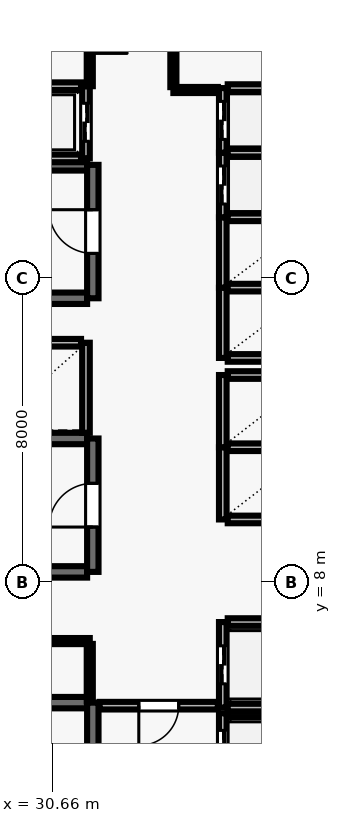
"""IFC4 building model, lengths in metres.
Left out: names, types, materials, properties, quantities, classifications, styles, units other than length and angle.
Written with IfcOpenShell. Run it as: python <this file> out.ifc"""

import sys

from ifc_helpers import new_model, si_unit, direction, frame, frame_2d, origin, place, context, subcontext, project, spatial, rectangle, extrude, element, fill, save


model = new_model("IFC4")
c1 = context("Model", 3, precision=1e-05, world=origin(), true_north=direction((0.0, 1.0)))
c2 = subcontext(c1, "Body", "Model", "MODEL_VIEW")
j1 = project(units=[si_unit("LENGTHUNIT", "METRE"), si_unit("PLANEANGLEUNIT", "RADIAN")], contexts=[c1])
p1 = place(None, origin())
s1 = spatial("IfcSite", under=j1, at=p1, CompositionType="ELEMENT")
p2 = place(p1, origin())
s2 = spatial("IfcBuilding", under=s1, at=p2, CompositionType="ELEMENT")
p3 = place(p2, frame((0.0, 0.0, 122.9)))
s3 = spatial("IfcBuildingStorey", under=s2, at=p3, CompositionType="ELEMENT", Elevation=122.9)
p4 = place(p3, frame((31.58, 4.83, 0.0), z_axis=(0.0, 0.0, 1.0), x_axis=(-1.0, 0.0, 0.0)))
e1 = element("IfcWall", 1, at=p4, inside=s3, PredefinedType="SHEAR", context=c2, shape_type="SweptSolid", body=[
    extrude(rectangle(XDim=8.36, YDim=0.3, at=frame_2d((4.18, 0.0))), origin(), (0.0, 0.0, 1.0), 3.69),
])
p5 = place(p3, frame((31.73, 0.96, 0.0), z_axis=(0.0, 0.0, 1.0), x_axis=(0.0, 1.0, 0.0)))
e2 = element("IfcWall", 2, at=p5, inside=s3, PredefinedType="SHEAR", context=c2, shape_type="SweptSolid", body=[
    extrude(rectangle(XDim=3.87, YDim=0.3, at=frame_2d((1.935, 0.0))), origin(), (0.0, 0.0, 1.0), 3.69),
])
p6 = place(p5, frame((1.54, 0.0, 0.0)))
e3 = element("IfcOpeningElement", 3, at=p6, cuts=e2, PredefinedType="OPENING", context=c2, shape_type="SweptSolid", body=[
    extrude(rectangle(XDim=1.15, YDim=2.15, at=frame_2d((0.575, 1.075))), frame((0.0, 0.16, 0.0), z_axis=(0.0, -1.0, 0.0), x_axis=(1.0, 0.0, 0.0)), (0.0, 0.0, 1.0), 0.32),
])
for number, where, z_axis, x_axis in (
    (4, (31.58, 18.98, 0.0), (0.0, 0.0, 1.0), (-1.0, 0.0, 0.0)),
    (5, (23.22, 15.47, 0.0), (0.0, 0.0, 1.0), (1.0, 0.0, 0.0)),
):
    element("IfcWall", number, at=place(p3, frame(where, z_axis=z_axis, x_axis=x_axis)), inside=s3, PredefinedType="SHEAR", context=c2, shape_type="SweptSolid", body=[
        extrude(rectangle(XDim=8.36, YDim=0.3, at=frame_2d((4.18, 0.0))), origin(), (0.0, 0.0, 1.0), 3.69),
    ])
p7 = place(p3, frame((31.73, 15.47, 0.0), z_axis=(0.0, 0.0, 1.0), x_axis=(0.0, 1.0, 0.0)))
e6 = element("IfcWall", 6, at=p7, inside=s3, PredefinedType="SHEAR", context=c2, shape_type="SweptSolid", body=[
    extrude(rectangle(XDim=3.51, YDim=0.3, at=frame_2d((1.755, 0.0))), origin(), (0.0, 0.0, 1.0), 3.69),
])
p8 = place(p7, frame((1.18, 0.0, 0.0)))
e7 = element("IfcOpeningElement", 7, at=p8, cuts=e6, PredefinedType="OPENING", context=c2, shape_type="SweptSolid", body=[
    extrude(rectangle(XDim=1.15, YDim=2.15, at=frame_2d((0.575, 1.075))), frame((0.0, 0.16, 0.0), z_axis=(0.0, -1.0, 0.0), x_axis=(1.0, 0.0, 0.0)), (0.0, 0.0, 1.0), 0.32),
])
for number, where, z_axis, x_axis in (
    (8, (31.58, 11.78, 0.0), (0.0, 0.0, 1.0), (-1.0, 0.0, 0.0)),
    (9, (23.22, 8.27, 0.0), (0.0, 0.0, 1.0), (1.0, 0.0, 0.0)),
):
    element("IfcWall", number, at=place(p3, frame(where, z_axis=z_axis, x_axis=x_axis)), inside=s3, PredefinedType="SHEAR", context=c2, shape_type="SweptSolid", body=[
        extrude(rectangle(XDim=8.36, YDim=0.3, at=frame_2d((4.18, 0.0))), origin(), (0.0, 0.0, 1.0), 3.69),
    ])
p9 = place(p3, frame((31.73, 8.27, 0.0), z_axis=(0.0, 0.0, 1.0), x_axis=(0.0, 1.0, 0.0)))
e10 = element("IfcWall", 10, at=p9, inside=s3, PredefinedType="SHEAR", context=c2, shape_type="SweptSolid", body=[
    extrude(rectangle(XDim=3.51, YDim=0.3, at=frame_2d((1.755, 0.0))), origin(), (0.0, 0.0, 1.0), 3.69),
])
p10 = place(p9, frame((1.18, 0.0, 0.0)))
e11 = element("IfcOpeningElement", 11, at=p10, cuts=e10, PredefinedType="OPENING", context=c2, shape_type="SweptSolid", body=[
    extrude(rectangle(XDim=1.15, YDim=2.15, at=frame_2d((0.575, 1.075))), frame((0.0, 0.16, 0.0), z_axis=(0.0, -1.0, 0.0), x_axis=(1.0, 0.0, 0.0)), (0.0, 0.0, 1.0), 0.32),
])
p11 = place(p3, frame((35.15, 4.55, 0.0), z_axis=(0.0, 0.0, 1.0), x_axis=(0.0, -1.0, 0.0)))
e12 = element("IfcWall", 12, at=p11, inside=s3, PredefinedType="SOLIDWALL", context=c2, shape_type="SweptSolid", body=[
    extrude(rectangle(XDim=2.1, YDim=0.2, at=frame_2d((1.05, 0.0))), origin(), (0.0, 0.0, 1.0), 3.69),
])
p12 = place(p11, frame((0.45, 0.0, 0.0)))
e13 = element("IfcOpeningElement", 13, at=p12, cuts=e12, PredefinedType="OPENING", context=c2, shape_type="SweptSolid", body=[
    extrude(rectangle(XDim=1.2, YDim=2.15, at=frame_2d((0.6, 1.075))), frame((0.0, 0.11, 0.0), z_axis=(0.0, -1.0, 0.0), x_axis=(1.0, 0.0, 0.0)), (0.0, 0.0, 1.0), 0.22),
])
p13 = place(p3, frame((37.42, 4.55, 0.0), z_axis=(0.0, 0.0, 1.0), x_axis=(-1.0, 0.0, 0.0)))
e14 = element("IfcWall", 14, at=p13, inside=s3, PredefinedType="SOLIDWALL", context=c2, shape_type="SweptSolid", body=[
    extrude(rectangle(XDim=2.14, YDim=0.2, at=frame_2d((1.07, 0.0))), origin(), (0.0, 0.0, 1.0), 3.69),
])
p14 = place(p3, frame((35.15, 6.95, 0.0), z_axis=(0.0, 0.0, 1.0), x_axis=(0.0, -1.0, 0.0)))
e15 = element("IfcWall", 15, at=p14, inside=s3, PredefinedType="SOLIDWALL", context=c2, shape_type="SweptSolid", body=[
    extrude(rectangle(XDim=2.25, YDim=0.2, at=frame_2d((1.125, 0.0))), origin(), (0.0, 0.0, 1.0), 3.69),
])
p15 = place(p14, frame((0.625, 0.0, 0.0)))
e16 = element("IfcOpeningElement", 16, at=p15, cuts=e15, PredefinedType="OPENING", context=c2, shape_type="SweptSolid", body=[
    extrude(rectangle(XDim=1.0, YDim=2.1, at=frame_2d((0.5, 1.05))), frame((0.0, 0.11, 0.0), z_axis=(0.0, -1.0, 0.0), x_axis=(1.0, 0.0, 0.0)), (0.0, 0.0, 1.0), 0.22),
])
for number, where, z_axis, x_axis in (
    (17, (35.28, 4.7, 0.0), (0.0, 0.0, 1.0), (1.0, 0.0, 0.0)),
    (18, (37.42, 6.95, 0.0), (0.0, 0.0, 1.0), (-1.0, 0.0, 0.0)),
):
    element("IfcWall", number, at=place(p3, frame(where, z_axis=z_axis, x_axis=x_axis)), inside=s3, PredefinedType="SOLIDWALL", context=c2, shape_type="SweptSolid", body=[
        extrude(rectangle(XDim=2.14, YDim=0.2, at=frame_2d((1.07, 0.0))), origin(), (0.0, 0.0, 1.0), 3.69),
    ])
p16 = place(p3, frame((35.15, 11.55, 0.0), z_axis=(0.0, 0.0, 1.0), x_axis=(0.0, -1.0, 0.0)))
e19 = element("IfcWall", 19, at=p16, inside=s3, PredefinedType="SOLIDWALL", context=c2, shape_type="SweptSolid", body=[
    extrude(rectangle(XDim=1.9, YDim=0.2, at=frame_2d((0.95, 0.0))), origin(), (0.0, 0.0, 1.0), 3.69),
])
for number, where, z_axis, x_axis in (
    (20, (35.28, 9.65, 0.0), (0.0, 0.0, 1.0), (1.0, 0.0, 0.0)),
    (21, (37.42, 11.55, 0.0), (0.0, 0.0, 1.0), (-1.0, 0.0, 0.0)),
):
    element("IfcWall", number, at=place(p3, frame(where, z_axis=z_axis, x_axis=x_axis)), inside=s3, PredefinedType="SOLIDWALL", context=c2, shape_type="SweptSolid", body=[
        extrude(rectangle(XDim=2.14, YDim=0.2, at=frame_2d((1.07, 0.0))), origin(), (0.0, 0.0, 1.0), 3.69),
    ])
p17 = place(p3, frame((35.15, 13.45, 0.0), z_axis=(0.0, 0.0, 1.0), x_axis=(0.0, -1.0, 0.0)))
e22 = element("IfcWall", 22, at=p17, inside=s3, PredefinedType="SOLIDWALL", context=c2, shape_type="SweptSolid", body=[
    extrude(rectangle(XDim=1.9, YDim=0.2, at=frame_2d((0.95, 0.0))), origin(), (0.0, 0.0, 1.0), 3.69),
])
p18 = place(p3, frame((37.42, 13.45, 0.0), z_axis=(0.0, 0.0, 1.0), x_axis=(-1.0, 0.0, 0.0)))
e23 = element("IfcWall", 23, at=p18, inside=s3, PredefinedType="SOLIDWALL", context=c2, shape_type="SweptSolid", body=[
    extrude(rectangle(XDim=2.14, YDim=0.2, at=frame_2d((1.07, 0.0))), origin(), (0.0, 0.0, 1.0), 3.69),
])
p19 = place(p3, frame((31.55, 11.93, 0.0), z_axis=(0.0, 0.0, 1.0), x_axis=(0.0, 1.0, 0.0)))
e24 = element("IfcWall", 24, at=p19, inside=s3, PredefinedType="SOLIDWALL", context=c2, shape_type="SweptSolid", body=[
    extrude(rectangle(XDim=2.37, YDim=0.2, at=frame_2d((1.185, 0.0))), origin(), (0.0, 0.0, 1.0), 3.69),
])
p20 = place(p3, frame((31.42, 14.3, 0.0), z_axis=(0.0, 0.0, 1.0), x_axis=(-1.0, 0.0, 0.0)))
e25 = element("IfcWall", 25, at=p20, inside=s3, PredefinedType="SOLIDWALL", context=c2, shape_type="SweptSolid", body=[
    extrude(rectangle(XDim=2.44, YDim=0.2, at=frame_2d((1.22, 0.0))), origin(), (0.0, 0.0, 1.0), 3.69),
])
p21 = place(p3, frame((35.15, 15.75, 0.0), z_axis=(0.0, 0.0, 1.0), x_axis=(0.0, -1.0, 0.0)))
e26 = element("IfcWall", 26, at=p21, inside=s3, PredefinedType="SOLIDWALL", context=c2, shape_type="SweptSolid", body=[
    extrude(rectangle(XDim=1.85, YDim=0.2, at=frame_2d((0.925, 0.0))), origin(), (0.0, 0.0, 1.0), 3.69),
])
for number, where, z_axis, x_axis in (
    (27, (35.28, 13.9, 0.0), (0.0, 0.0, 1.0), (1.0, 0.0, 0.0)),
    (28, (37.42, 15.75, 0.0), (0.0, 0.0, 1.0), (-1.0, 0.0, 0.0)),
):
    element("IfcWall", number, at=place(p3, frame(where, z_axis=z_axis, x_axis=x_axis)), inside=s3, PredefinedType="SOLIDWALL", context=c2, shape_type="SweptSolid", body=[
        extrude(rectangle(XDim=2.14, YDim=0.2, at=frame_2d((1.07, 0.0))), origin(), (0.0, 0.0, 1.0), 3.69),
    ])
p22 = place(p3, frame((35.15, 17.6, 0.0), z_axis=(0.0, 0.0, 1.0), x_axis=(0.0, -1.0, 0.0)))
e29 = element("IfcWall", 29, at=p22, inside=s3, PredefinedType="SOLIDWALL", context=c2, shape_type="SweptSolid", body=[
    extrude(rectangle(XDim=1.85, YDim=0.2, at=frame_2d((0.925, 0.0))), origin(), (0.0, 0.0, 1.0), 3.69),
])
p23 = place(p3, frame((37.42, 17.6, 0.0), z_axis=(0.0, 0.0, 1.0), x_axis=(-1.0, 0.0, 0.0)))
e30 = element("IfcWall", 30, at=p23, inside=s3, PredefinedType="SOLIDWALL", context=c2, shape_type="SweptSolid", body=[
    extrude(rectangle(XDim=2.14, YDim=0.2, at=frame_2d((1.07, 0.0))), origin(), (0.0, 0.0, 1.0), 3.69),
])
p24 = place(p3, frame((35.15, 19.3, 0.0), z_axis=(0.0, 0.0, 1.0), x_axis=(0.0, -1.0, 0.0)))
e31 = element("IfcWall", 31, at=p24, inside=s3, PredefinedType="SOLIDWALL", context=c2, shape_type="SweptSolid", body=[
    extrude(rectangle(XDim=1.7, YDim=0.2, at=frame_2d((0.85, 0.0))), origin(), (0.0, 0.0, 1.0), 3.69),
])
p25 = place(p24, frame((0.35, 0.0, 0.0)))
e32 = element("IfcOpeningElement", 32, at=p25, cuts=e31, PredefinedType="OPENING", context=c2, shape_type="SweptSolid", body=[
    extrude(rectangle(XDim=1.0, YDim=2.1, at=frame_2d((0.5, 1.05))), frame((0.0, 0.11, 0.0), z_axis=(0.0, -1.0, 0.0), x_axis=(1.0, 0.0, 0.0)), (0.0, 0.0, 1.0), 0.22),
])
p26 = place(p3, frame((37.42, 19.3, 0.0), z_axis=(0.0, 0.0, 1.0), x_axis=(-1.0, 0.0, 0.0)))
e33 = element("IfcWall", 33, at=p26, inside=s3, PredefinedType="SOLIDWALL", context=c2, shape_type="SweptSolid", body=[
    extrude(rectangle(XDim=2.14, YDim=0.2, at=frame_2d((1.07, 0.0))), origin(), (0.0, 0.0, 1.0), 3.69),
])
p27 = place(p3, frame((35.15, 21.0, 0.0), z_axis=(0.0, 0.0, 1.0), x_axis=(0.0, -1.0, 0.0)))
e34 = element("IfcWall", 34, at=p27, inside=s3, PredefinedType="SOLIDWALL", context=c2, shape_type="SweptSolid", body=[
    extrude(rectangle(XDim=1.7, YDim=0.2, at=frame_2d((0.85, 0.0))), origin(), (0.0, 0.0, 1.0), 3.69),
])
p28 = place(p27, frame((0.35, 0.0, 0.0)))
e35 = element("IfcOpeningElement", 35, at=p28, cuts=e34, PredefinedType="OPENING", context=c2, shape_type="SweptSolid", body=[
    extrude(rectangle(XDim=1.0, YDim=2.1, at=frame_2d((0.5, 1.05))), frame((0.0, 0.11, 0.0), z_axis=(0.0, -1.0, 0.0), x_axis=(1.0, 0.0, 0.0)), (0.0, 0.0, 1.0), 0.22),
])
p29 = place(p3, frame((37.42, 21.0, 0.0), z_axis=(0.0, 0.0, 1.0), x_axis=(-1.0, 0.0, 0.0)))
e36 = element("IfcWall", 36, at=p29, inside=s3, PredefinedType="SOLIDWALL", context=c2, shape_type="SweptSolid", body=[
    extrude(rectangle(XDim=2.14, YDim=0.2, at=frame_2d((1.07, 0.0))), origin(), (0.0, 0.0, 1.0), 3.69),
])
p30 = place(p3, frame((31.55, 19.15, 0.0), z_axis=(0.0, 0.0, 1.0), x_axis=(0.0, 1.0, 0.0)))
e37 = element("IfcWall", 37, at=p30, inside=s3, PredefinedType="SOLIDWALL", context=c2, shape_type="SweptSolid", body=[
    extrude(rectangle(XDim=1.9, YDim=0.2, at=frame_2d((0.95, 0.0))), origin(), (0.0, 0.0, 1.0), 3.69),
])
p31 = place(p30, frame((0.45, 0.0, 0.0)))
e38 = element("IfcOpeningElement", 38, at=p31, cuts=e37, PredefinedType="OPENING", context=c2, shape_type="SweptSolid", body=[
    extrude(rectangle(XDim=1.0, YDim=2.1, at=frame_2d((0.5, 1.05))), frame((0.0, 0.11, 0.0), z_axis=(0.0, -1.0, 0.0), x_axis=(1.0, 0.0, 0.0)), (0.0, 0.0, 1.0), 0.22),
])
for number, where, z_axis, x_axis in (
    (39, (28.98, 19.15, 0.0), (0.0, 0.0, 1.0), (1.0, 0.0, 0.0)),
    (40, (31.42, 21.05, 0.0), (0.0, 0.0, 1.0), (-1.0, 0.0, 0.0)),
):
    element("IfcWall", number, at=place(p3, frame(where, z_axis=z_axis, x_axis=x_axis)), inside=s3, PredefinedType="SOLIDWALL", context=c2, shape_type="SweptSolid", body=[
        extrude(rectangle(XDim=2.44, YDim=0.2, at=frame_2d((1.22, 0.0))), origin(), (0.0, 0.0, 1.0), 3.69),
    ])
p32 = place(p3, frame((28.55, 6.45, 0.0), z_axis=(0.0, 0.0, 1.0), x_axis=(1.0, 0.0, 0.0)))
e41 = element("IfcWall", 41, at=p32, inside=s3, PredefinedType="PARTITIONING", context=c2, shape_type="SweptSolid", body=[
    extrude(rectangle(XDim=3.1, YDim=0.16, at=frame_2d((1.55, 0.0))), origin(), (0.0, 0.0, 1.0), 3.69),
])
p33 = place(p32, frame((1.11, 0.0, 0.0)))
e42 = element("IfcOpeningElement", 42, at=p33, cuts=e41, PredefinedType="OPENING", context=c2, shape_type="SweptSolid", body=[
    extrude(rectangle(XDim=0.88, YDim=2.1, at=frame_2d((0.44, 1.05))), frame((0.0, 0.09, 0.0), z_axis=(0.0, -1.0, 0.0), x_axis=(1.0, 0.0, 0.0)), (0.0, 0.0, 1.0), 0.18),
])
p34 = place(p3, frame((35.02, 4.75, 0.0), z_axis=(0.0, 0.0, 1.0), x_axis=(-1.0, 0.0, 0.0)))
e43 = element("IfcWall", 43, at=p34, inside=s3, PredefinedType="SOLIDWALL", context=c2, shape_type="SweptSolid", body=[
    extrude(rectangle(XDim=3.11, YDim=0.2, at=frame_2d((1.555, 0.0))), origin(), (0.0, 0.0, 1.0), 3.69),
])
p35 = place(p34, frame((1.03, 0.0, 0.0)))
e44 = element("IfcOpeningElement", 44, at=p35, cuts=e43, PredefinedType="OPENING", context=c2, shape_type="SweptSolid", body=[
    extrude(rectangle(XDim=1.05, YDim=2.15, at=frame_2d((0.525, 1.075))), frame((0.0, 0.11, 0.0), z_axis=(0.0, -1.0, 0.0), x_axis=(1.0, 0.0, 0.0)), (0.0, 0.0, 1.0), 0.22),
])
p36 = place(p3, frame((35.02, 20.95, 0.0), z_axis=(0.0, 0.0, 1.0), x_axis=(-1.0, 0.0, 0.0)))
e45 = element("IfcWall", 45, at=p36, inside=s3, PredefinedType="PARTITIONING", context=c2, shape_type="SweptSolid", body=[
    extrude(rectangle(XDim=1.17, YDim=0.16, at=frame_2d((0.585, 0.0))), origin(), (0.0, 0.0, 1.0), 3.69),
])
p37 = place(p3, frame((31.65, 4.86, 0.0), z_axis=(0.0, 0.0, 1.0), x_axis=(0.0, 1.0, 0.0)))
e46 = element("IfcWall", 46, at=p37, inside=s3, PredefinedType="PARTITIONING", context=c2, shape_type="SweptSolid", body=[
    extrude(rectangle(XDim=1.515, YDim=0.16, at=frame_2d((0.757, 0.0))), origin(), (0.0, 0.0, 1.0), 3.69),
])
p38 = place(p3, frame((31.65, 23.775, 0.0), z_axis=(0.0, 0.0, 1.0), x_axis=(0.0, -1.0, 0.0)))
e47 = element("IfcWall", 47, at=p38, inside=s3, PredefinedType="PARTITIONING", context=c2, shape_type="SweptSolid", body=[
    extrude(rectangle(XDim=2.725, YDim=0.16, at=frame_2d((1.362, 0.0))), origin(), (0.0, 0.0, 1.0), 3.69),
])
p39 = place(p38, frame((0.862, 0.0, 0.0)))
e48 = element("IfcOpeningElement", 48, at=p39, cuts=e47, PredefinedType="OPENING", context=c2, shape_type="SweptSolid", body=[
    extrude(rectangle(XDim=1.0, YDim=2.1, at=frame_2d((0.5, 1.05))), frame((0.0, 0.09, 0.0), z_axis=(0.0, -1.0, 0.0), x_axis=(1.0, 0.0, 0.0)), (0.0, 0.0, 1.0), 0.18),
])
p40 = place(p3, frame((33.85, 21.025, 0.0), z_axis=(0.0, 0.0, 1.0), x_axis=(0.0, 1.0, 0.0)))
e49 = element("IfcWall", 49, at=p40, inside=s3, PredefinedType="PARTITIONING", context=c2, shape_type="SweptSolid", body=[
    extrude(rectangle(XDim=2.75, YDim=0.16, at=frame_2d((1.375, 0.0))), origin(), (0.0, 0.0, 1.0), 3.69),
])
p41 = place(p8, origin())
e50 = element("IfcDoor", 50, at=p41, inside=s3, OperationType="SINGLE_SWING_RIGHT", PredefinedType="DOOR", context=c2, shape_type="SweptSolid", body=[
    extrude(rectangle(XDim=1.15, YDim=2.15, at=frame_2d((0.575, 1.075))), frame((0.0, 0.025, 0.0), z_axis=(0.0, -1.0, 0.0), x_axis=(1.0, 0.0, 0.0)), (0.0, 0.0, 1.0), 0.05),
])
fill(e7, e50)
p42 = place(p10, origin())
e51 = element("IfcDoor", 51, at=p42, inside=s3, OperationType="SINGLE_SWING_LEFT", PredefinedType="DOOR", context=c2, shape_type="SweptSolid", body=[
    extrude(rectangle(XDim=1.15, YDim=2.15, at=frame_2d((0.575, 1.075))), frame((0.0, 0.025, 0.0), z_axis=(0.0, -1.0, 0.0), x_axis=(1.0, 0.0, 0.0)), (0.0, 0.0, 1.0), 0.05),
])
fill(e11, e51)
p43 = place(p12, origin())
e52 = element("IfcDoor", 52, at=p43, inside=s3, OperationType="DOUBLE_DOOR_SLIDING", PredefinedType="DOOR", context=c2, shape_type="SweptSolid", body=[
    extrude(rectangle(XDim=1.2, YDim=2.15, at=frame_2d((0.6, 1.075))), frame((0.0, 0.025, 0.0), z_axis=(0.0, -1.0, 0.0), x_axis=(1.0, 0.0, 0.0)), (0.0, 0.0, 1.0), 0.05),
])
fill(e13, e52)
p44 = place(p15, origin())
e53 = element("IfcDoor", 53, at=p44, inside=s3, OperationType="DOUBLE_DOOR_SLIDING", PredefinedType="DOOR", context=c2, shape_type="SweptSolid", body=[
    extrude(rectangle(XDim=1.0, YDim=2.1, at=frame_2d((0.5, 1.05))), frame((0.0, 0.025, 0.0), z_axis=(0.0, -1.0, 0.0), x_axis=(1.0, 0.0, 0.0)), (0.0, 0.0, 1.0), 0.05),
])
fill(e16, e53)
p45 = place(p25, origin())
e54 = element("IfcDoor", 54, at=p45, inside=s3, OperationType="DOUBLE_DOOR_SLIDING", PredefinedType="DOOR", context=c2, shape_type="SweptSolid", body=[
    extrude(rectangle(XDim=1.0, YDim=2.1, at=frame_2d((0.5, 1.05))), frame((0.0, 0.025, 0.0), z_axis=(0.0, -1.0, 0.0), x_axis=(1.0, 0.0, 0.0)), (0.0, 0.0, 1.0), 0.05),
])
fill(e32, e54)
p46 = place(p28, origin())
e55 = element("IfcDoor", 55, at=p46, inside=s3, OperationType="DOUBLE_DOOR_SLIDING", PredefinedType="DOOR", context=c2, shape_type="SweptSolid", body=[
    extrude(rectangle(XDim=1.0, YDim=2.1, at=frame_2d((0.5, 1.05))), frame((0.0, 0.025, 0.0), z_axis=(0.0, -1.0, 0.0), x_axis=(1.0, 0.0, 0.0)), (0.0, 0.0, 1.0), 0.05),
])
fill(e35, e55)
p47 = place(p31, origin())
e56 = element("IfcDoor", 56, at=p47, inside=s3, OperationType="DOUBLE_DOOR_SLIDING", PredefinedType="DOOR", context=c2, shape_type="SweptSolid", body=[
    extrude(rectangle(XDim=1.0, YDim=2.1, at=frame_2d((0.5, 1.05))), frame((0.0, 0.025, 0.0), z_axis=(0.0, -1.0, 0.0), x_axis=(1.0, 0.0, 0.0)), (0.0, 0.0, 1.0), 0.05),
])
fill(e38, e56)
p48 = place(p35, origin())
e57 = element("IfcDoor", 57, at=p48, inside=s3, OperationType="SINGLE_SWING_RIGHT", PredefinedType="DOOR", context=c2, shape_type="SweptSolid", body=[
    extrude(rectangle(XDim=1.05, YDim=2.15, at=frame_2d((0.525, 1.075))), frame((0.0, 0.025, 0.0), z_axis=(0.0, -1.0, 0.0), x_axis=(1.0, 0.0, 0.0)), (0.0, 0.0, 1.0), 0.05),
])
fill(e44, e57)
p49 = place(p39, origin())
e58 = element("IfcDoor", 58, at=p49, inside=s3, OperationType="SINGLE_SWING_RIGHT", PredefinedType="DOOR", context=c2, shape_type="SweptSolid", body=[
    extrude(rectangle(XDim=1.0, YDim=2.1, at=frame_2d((0.5, 1.05))), frame((0.0, 0.025, 0.0), z_axis=(0.0, -1.0, 0.0), x_axis=(1.0, 0.0, 0.0)), (0.0, 0.0, 1.0), 0.05),
])
fill(e48, e58)
save(model, sys.argv[1])
